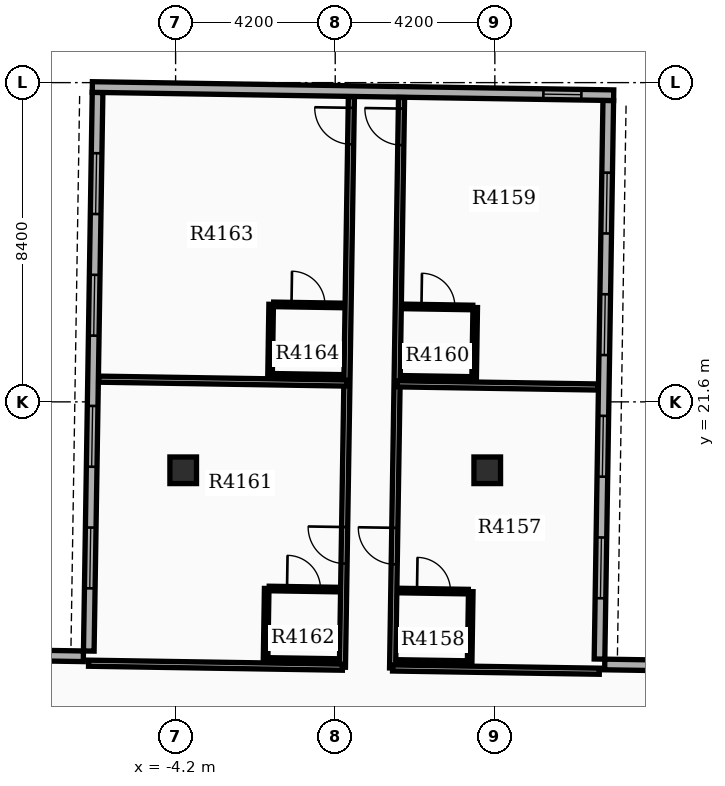
"""IFC4 building model, lengths in metres.
Left out: names, types, materials, properties, quantities, classifications, styles, units other than length and angle.
Written with IfcOpenShell. Run it as: python <this file> out.ifc"""

import sys

from ifc_helpers import new_model, si_unit, direction, frame, frame_2d, origin, origin_2d, place, context, subcontext, project, spatial, rectangle, extrude, element, fill, save


model = new_model("IFC4")
c1 = context("Model", 3, precision=1e-05, world=origin(), true_north=direction((0.0, 1.0)))
c2 = subcontext(c1, "Body", "Model", "MODEL_VIEW")
j1 = project(units=[si_unit("LENGTHUNIT", "METRE"), si_unit("PLANEANGLEUNIT", "RADIAN")], contexts=[c1])
p1 = place(None, origin())
s1 = spatial("IfcSite", under=j1, at=p1, CompositionType="ELEMENT")
p2 = place(p1, origin())
s2 = spatial("IfcBuilding", under=s1, at=p2, CompositionType="ELEMENT")
p3 = place(p2, frame((0.0, 0.0, 261.6)))
s3 = spatial("IfcBuildingStorey", under=s2, at=p3, CompositionType="ELEMENT", Elevation=261.6)
for number, where, z_axis, x_axis in (
    (1, (-4.0, 19.8, 0.0), (0.0, 0.0, 1.0), (1.0, 0.0, 0.0)),
    (2, (4.0, 19.8, 0.0), (0.0, 0.0, 1.0), (1.0, 0.0, 0.0)),
):
    element("IfcColumn", number, at=place(p3, frame(where, z_axis=z_axis, x_axis=x_axis)), inside=s3, PredefinedType="COLUMN", context=c2, shape_type="SweptSolid", body=[
        extrude(rectangle(XDim=0.7, YDim=0.7, at=origin_2d()), origin(), (0.0, 0.0, 1.0), 3.9),
    ])
p4 = place(p3, frame((6.954, 14.833, 0.0), z_axis=(0.0, 0.0, 1.0), x_axis=(0.015711302158, 0.999876569875, 0.0)))
e3 = element("IfcWall", 3, at=p4, inside=s3, PredefinedType="STANDARD", context=c2, shape_type="SweptSolid", body=[
    extrude(rectangle(XDim=14.7, YDim=0.28, at=frame_2d((7.35, 0.0))), origin(), (0.0, 0.0, 1.0), 3.18),
])
p5 = place(p4, frame((1.6, 0.0, 0.8)))
e4 = element("IfcOpeningElement", 4, at=p5, cuts=e3, PredefinedType="OPENING", context=c2, shape_type="SweptSolid", body=[
    extrude(rectangle(XDim=1.6, YDim=1.7, at=frame_2d((0.8, 0.85))), frame((0.0, 0.15, 0.0), z_axis=(0.0, -1.0, 0.0), x_axis=(1.0, 0.0, 0.0)), (0.0, 0.0, 1.0), 0.3),
])
p6 = place(p4, frame((4.8, 0.0, 0.8)))
e5 = element("IfcOpeningElement", 5, at=p6, cuts=e3, PredefinedType="OPENING", context=c2, shape_type="SweptSolid", body=[
    extrude(rectangle(XDim=1.6, YDim=1.7, at=frame_2d((0.8, 0.85))), frame((0.0, 0.15, 0.0), z_axis=(0.0, -1.0, 0.0), x_axis=(1.0, 0.0, 0.0)), (0.0, 0.0, 1.0), 0.3),
])
p7 = place(p4, frame((8.0, 0.0, 0.8)))
e6 = element("IfcOpeningElement", 6, at=p7, cuts=e3, PredefinedType="OPENING", context=c2, shape_type="SweptSolid", body=[
    extrude(rectangle(XDim=1.6, YDim=1.7, at=frame_2d((0.8, 0.85))), frame((0.0, 0.15, 0.0), z_axis=(0.0, -1.0, 0.0), x_axis=(1.0, 0.0, 0.0)), (0.0, 0.0, 1.0), 0.3),
])
p8 = place(p4, frame((11.2, 0.0, 0.8)))
e7 = element("IfcOpeningElement", 7, at=p8, cuts=e3, PredefinedType="OPENING", context=c2, shape_type="SweptSolid", body=[
    extrude(rectangle(XDim=1.6, YDim=1.7, at=frame_2d((0.8, 0.85))), frame((0.0, 0.15, 0.0), z_axis=(0.0, -1.0, 0.0), x_axis=(1.0, 0.0, 0.0)), (0.0, 0.0, 1.0), 0.3),
])
p9 = place(p3, frame((-6.254, 29.742, 0.0), z_axis=(0.0, 0.0, 1.0), x_axis=(-0.015711302158, -0.999876569875, 0.0)))
e8 = element("IfcWall", 8, at=p9, inside=s3, PredefinedType="STANDARD", context=c2, shape_type="SweptSolid", body=[
    extrude(rectangle(XDim=14.7, YDim=0.28, at=frame_2d((7.35, 0.0))), origin(), (0.0, 0.0, 1.0), 3.18),
])
p10 = place(p9, frame((1.6, 0.0, 0.8)))
e9 = element("IfcOpeningElement", 9, at=p10, cuts=e8, PredefinedType="OPENING", context=c2, shape_type="SweptSolid", body=[
    extrude(rectangle(XDim=1.6, YDim=1.7, at=frame_2d((0.8, 0.85))), frame((0.0, 0.15, 0.0), z_axis=(0.0, -1.0, 0.0), x_axis=(1.0, 0.0, 0.0)), (0.0, 0.0, 1.0), 0.3),
])
p11 = place(p9, frame((4.8, 0.0, 0.8)))
e10 = element("IfcOpeningElement", 10, at=p11, cuts=e8, PredefinedType="OPENING", context=c2, shape_type="SweptSolid", body=[
    extrude(rectangle(XDim=1.6, YDim=1.7, at=frame_2d((0.8, 0.85))), frame((0.0, 0.15, 0.0), z_axis=(0.0, -1.0, 0.0), x_axis=(1.0, 0.0, 0.0)), (0.0, 0.0, 1.0), 0.3),
])
p12 = place(p9, frame((8.25, 0.0, 0.8)))
e11 = element("IfcOpeningElement", 11, at=p12, cuts=e8, PredefinedType="OPENING", context=c2, shape_type="SweptSolid", body=[
    extrude(rectangle(XDim=1.6, YDim=1.7, at=frame_2d((0.8, 0.85))), frame((0.0, 0.15, 0.0), z_axis=(0.0, -1.0, 0.0), x_axis=(1.0, 0.0, 0.0)), (0.0, 0.0, 1.0), 0.3),
])
p13 = place(p9, frame((11.45, 0.0, 0.8)))
e12 = element("IfcOpeningElement", 12, at=p13, cuts=e8, PredefinedType="OPENING", context=c2, shape_type="SweptSolid", body=[
    extrude(rectangle(XDim=1.6, YDim=1.7, at=frame_2d((0.8, 0.85))), frame((0.0, 0.15, 0.0), z_axis=(0.0, -1.0, 0.0), x_axis=(1.0, 0.0, 0.0)), (0.0, 0.0, 1.0), 0.3),
])
p14 = place(p3, frame((7.327, 29.669, 0.0), z_axis=(0.0, 0.0, 1.0), x_axis=(-0.999876828887, 0.015694809807, 0.0)))
e13 = element("IfcWall", 13, at=p14, inside=s3, PredefinedType="STANDARD", context=c2, shape_type="SweptSolid", body=[
    extrude(rectangle(XDim=13.72, YDim=0.28, at=frame_2d((6.86, 0.0))), origin(), (0.0, 0.0, 1.0), 3.18),
])
p15 = place(p14, frame((0.85, 0.0, 0.85)))
e14 = element("IfcOpeningElement", 14, at=p15, cuts=e13, PredefinedType="OPENING", context=c2, shape_type="SweptSolid", body=[
    extrude(rectangle(XDim=1.0, YDim=1.5, at=frame_2d((0.5, 0.75))), frame((0.0, 0.15, 0.0), z_axis=(0.0, -1.0, 0.0), x_axis=(1.0, 0.0, 0.0)), (0.0, 0.0, 1.0), 0.3),
])
p16 = place(p3, frame((13.391, 14.592, 0.0), z_axis=(0.0, 0.0, 1.0), x_axis=(-0.999876833368, 0.015694524359, 0.0)))
e15 = element("IfcWall", 15, at=p16, inside=s3, PredefinedType="STANDARD", context=c2, shape_type="SweptSolid", body=[
    extrude(rectangle(XDim=6.3, YDim=0.28, at=frame_2d((3.15, 0.0))), origin(), (0.0, 0.0, 1.0), 3.18),
])
p17 = place(p3, frame((-12.926, 15.005, 0.0), z_axis=(0.0, 0.0, 1.0), x_axis=(0.999876823822, -0.015695132501, 0.0)))
e16 = element("IfcWall", 16, at=p17, inside=s3, PredefinedType="STANDARD", context=c2, shape_type="SweptSolid", body=[
    extrude(rectangle(XDim=6.3, YDim=0.28, at=frame_2d((3.15, 0.0))), origin(), (0.0, 0.0, 1.0), 3.18),
])
p18 = place(p3, frame((1.51, 14.598, 0.0), z_axis=(0.0, 0.0, 1.0), x_axis=(0.015709976686, 0.999876590701, 0.0)))
e17 = element("IfcWall", 17, at=p18, inside=s3, PredefinedType="PARTITIONING", context=c2, shape_type="SweptSolid", body=[
    extrude(rectangle(XDim=15.012, YDim=0.16, at=frame_2d((7.506, 0.0))), origin(), (0.0, 0.0, 1.0), 3.17),
])
p19 = place(p18, frame((2.728, 0.0, 0.0)))
e18 = element("IfcOpeningElement", 18, at=p19, cuts=e17, PredefinedType="OPENING", context=c2, shape_type="SweptSolid", body=[
    extrude(rectangle(XDim=0.96, YDim=2.15, at=frame_2d((0.48, 1.075))), frame((0.0, 0.09, 0.0), z_axis=(0.0, -1.0, 0.0), x_axis=(1.0, 0.0, 0.0)), (0.0, 0.0, 1.0), 0.18),
])
p20 = place(p18, frame((13.76, 0.0, 0.0)))
e19 = element("IfcOpeningElement", 19, at=p20, cuts=e17, PredefinedType="OPENING", context=c2, shape_type="SweptSolid", body=[
    extrude(rectangle(XDim=0.96, YDim=2.15, at=frame_2d((0.48, 1.075))), frame((0.0, 0.09, 0.0), z_axis=(0.0, -1.0, 0.0), x_axis=(1.0, 0.0, 0.0)), (0.0, 0.0, 1.0), 0.18),
])
p21 = place(p3, frame((1.51, 14.598, 0.0), z_axis=(0.0, 0.0, 1.0), x_axis=(0.999876622965, -0.015707923068, 0.0)))
e20 = element("IfcWall", 20, at=p21, inside=s3, PredefinedType="PARTITIONING", context=c2, shape_type="SweptSolid", body=[
    extrude(rectangle(XDim=5.44, YDim=0.16, at=frame_2d((2.72, 0.0))), origin(), (0.0, 0.0, 1.0), 3.17),
])
p22 = place(p3, frame((1.627, 22.074, 0.0), z_axis=(0.0, 0.0, 1.0), x_axis=(0.999876245763, -0.015731915277, 0.0)))
e21 = element("IfcWall", 21, at=p22, inside=s3, PredefinedType="PARTITIONING", context=c2, shape_type="SweptSolid", body=[
    extrude(rectangle(XDim=5.292, YDim=0.16, at=frame_2d((2.646, 0.0))), origin(), (0.0, 0.0, 1.0), 3.17),
])
p23 = place(p3, frame((1.681, 16.635, 0.0), z_axis=(0.0, 0.0, 1.0), x_axis=(0.999878932289, -0.015560230231, 0.0)))
e22 = element("IfcWall", 22, at=p23, inside=s3, PredefinedType="PARTITIONING", context=c2, shape_type="SweptSolid", body=[
    extrude(rectangle(XDim=1.82, YDim=0.12, at=frame_2d((0.91, 0.0))), origin(), (0.0, 0.0, 1.0), 3.17),
])
p24 = place(p23, frame((0.47, 0.0, 0.0)))
e23 = element("IfcOpeningElement", 23, at=p24, cuts=e22, PredefinedType="OPENING", context=c2, shape_type="SweptSolid", body=[
    extrude(rectangle(XDim=0.88, YDim=2.1, at=frame_2d((0.44, 1.05))), frame((0.0, 0.07, 0.0), z_axis=(0.0, -1.0, 0.0), x_axis=(1.0, 0.0, 0.0)), (0.0, 0.0, 1.0), 0.14),
])
p25 = place(p3, frame((1.652, 14.756, 0.0), z_axis=(0.0, 0.0, 1.0), x_axis=(0.999876803258, -0.015696442504, 0.0)))
e24 = element("IfcWall", 24, at=p25, inside=s3, PredefinedType="PARTITIONING", context=c2, shape_type="SweptSolid", body=[
    extrude(rectangle(XDim=1.82, YDim=0.12, at=frame_2d((0.91, 0.0))), origin(), (0.0, 0.0, 1.0), 3.17),
])
p26 = place(p3, frame((3.537, 14.726, 0.0), z_axis=(0.0, 0.0, 1.0), x_axis=(0.015844224657, 0.999874472394, 0.0)))
e25 = element("IfcWall", 25, at=p26, inside=s3, PredefinedType="PARTITIONING", context=c2, shape_type="SweptSolid", body=[
    extrude(rectangle(XDim=1.88, YDim=0.12, at=frame_2d((0.94, 0.0))), origin(), (0.0, 0.0, 1.0), 3.17),
])
p27 = place(p3, frame((1.799, 24.112, 0.0), z_axis=(0.0, 0.0, 1.0), x_axis=(0.999874688728, -0.015830566654, 0.0)))
e26 = element("IfcWall", 26, at=p27, inside=s3, PredefinedType="PARTITIONING", context=c2, shape_type="SweptSolid", body=[
    extrude(rectangle(XDim=1.82, YDim=0.12, at=frame_2d((0.91, 0.0))), origin(), (0.0, 0.0, 1.0), 3.17),
])
p28 = place(p27, frame((0.47, 0.0, 0.0)))
e27 = element("IfcOpeningElement", 27, at=p28, cuts=e26, PredefinedType="OPENING", context=c2, shape_type="SweptSolid", body=[
    extrude(rectangle(XDim=0.88, YDim=2.1, at=frame_2d((0.44, 1.05))), frame((0.0, 0.07, 0.0), z_axis=(0.0, -1.0, 0.0), x_axis=(1.0, 0.0, 0.0)), (0.0, 0.0, 1.0), 0.14),
])
p29 = place(p3, frame((1.769, 22.232, 0.0), z_axis=(0.0, 0.0, 1.0), x_axis=(0.999876836305, -0.015694337248, 0.0)))
e28 = element("IfcWall", 28, at=p29, inside=s3, PredefinedType="PARTITIONING", context=c2, shape_type="SweptSolid", body=[
    extrude(rectangle(XDim=1.82, YDim=0.12, at=frame_2d((0.91, 0.0))), origin(), (0.0, 0.0, 1.0), 3.17),
])
p30 = place(p3, frame((3.654, 22.202, 0.0), z_axis=(0.0, 0.0, 1.0), x_axis=(0.01558454688, 0.999878553575, 0.0)))
e29 = element("IfcWall", 29, at=p30, inside=s3, PredefinedType="PARTITIONING", context=c2, shape_type="SweptSolid", body=[
    extrude(rectangle(XDim=1.88, YDim=0.12, at=frame_2d((0.94, 0.0))), origin(), (0.0, 0.0, 1.0), 3.17),
])
p31 = place(p3, frame((0.19, 14.619, 0.0), z_axis=(0.0, 0.0, 1.0), x_axis=(0.015710232149, 0.999876586687, 0.0)))
e30 = element("IfcWall", 30, at=p31, inside=s3, PredefinedType="PARTITIONING", context=c2, shape_type="SweptSolid", body=[
    extrude(rectangle(XDim=15.012, YDim=0.16, at=frame_2d((7.506, 0.0))), origin(), (0.0, 0.0, 1.0), 3.17),
])
p32 = place(p31, frame((2.728, 0.0, 0.0)))
e31 = element("IfcOpeningElement", 31, at=p32, cuts=e30, PredefinedType="OPENING", context=c2, shape_type="SweptSolid", body=[
    extrude(rectangle(XDim=0.96, YDim=2.15, at=frame_2d((0.48, 1.075))), frame((0.0, 0.09, 0.0), z_axis=(0.0, -1.0, 0.0), x_axis=(1.0, 0.0, 0.0)), (0.0, 0.0, 1.0), 0.18),
])
p33 = place(p31, frame((13.76, 0.0, 0.0)))
e32 = element("IfcOpeningElement", 32, at=p33, cuts=e30, PredefinedType="OPENING", context=c2, shape_type="SweptSolid", body=[
    extrude(rectangle(XDim=0.96, YDim=2.15, at=frame_2d((0.48, 1.075))), frame((0.0, 0.09, 0.0), z_axis=(0.0, -1.0, 0.0), x_axis=(1.0, 0.0, 0.0)), (0.0, 0.0, 1.0), 0.18),
])
p34 = place(p3, frame((0.19, 14.619, 0.0), z_axis=(0.0, 0.0, 1.0), x_axis=(-0.999877076246, 0.015679043267, 0.0)))
e33 = element("IfcWall", 33, at=p34, inside=s3, PredefinedType="PARTITIONING", context=c2, shape_type="SweptSolid", body=[
    extrude(rectangle(XDim=6.68, YDim=0.16, at=frame_2d((3.34, 0.0))), origin(), (0.0, 0.0, 1.0), 3.17),
])
p35 = place(p3, frame((0.307, 22.095, 0.0), z_axis=(0.0, 0.0, 1.0), x_axis=(-0.999876781534, 0.015697826265, 0.0)))
e34 = element("IfcWall", 34, at=p35, inside=s3, PredefinedType="PARTITIONING", context=c2, shape_type="SweptSolid", body=[
    extrude(rectangle(XDim=6.532, YDim=0.16, at=frame_2d((3.266, 0.0))), origin(), (0.0, 0.0, 1.0), 3.17),
])
p36 = place(p3, frame((-1.738, 16.689, 0.0), z_axis=(0.0, 0.0, 1.0), x_axis=(0.999876836305, -0.015694337248, 0.0)))
e35 = element("IfcWall", 35, at=p36, inside=s3, PredefinedType="PARTITIONING", context=c2, shape_type="SweptSolid", body=[
    extrude(rectangle(XDim=1.82, YDim=0.12, at=frame_2d((0.91, 0.0))), origin(), (0.0, 0.0, 1.0), 3.17),
])
p37 = place(p36, frame((0.47, 0.0, 0.0)))
e36 = element("IfcOpeningElement", 36, at=p37, cuts=e35, PredefinedType="OPENING", context=c2, shape_type="SweptSolid", body=[
    extrude(rectangle(XDim=0.88, YDim=2.1, at=frame_2d((0.44, 1.05))), frame((0.0, 0.07, 0.0), z_axis=(0.0, -1.0, 0.0), x_axis=(1.0, 0.0, 0.0)), (0.0, 0.0, 1.0), 0.14),
])
p38 = place(p3, frame((-1.768, 14.81, 0.0), z_axis=(0.0, 0.0, 1.0), x_axis=(0.999876836305, -0.015694337248, 0.0)))
e37 = element("IfcWall", 37, at=p38, inside=s3, PredefinedType="PARTITIONING", context=c2, shape_type="SweptSolid", body=[
    extrude(rectangle(XDim=1.82, YDim=0.12, at=frame_2d((0.91, 0.0))), origin(), (0.0, 0.0, 1.0), 3.17),
])
p39 = place(p3, frame((-1.833, 14.811, 0.0), z_axis=(0.0, 0.0, 1.0), x_axis=(0.01571234584, 0.999876553475, 0.0)))
e38 = element("IfcWall", 38, at=p39, inside=s3, PredefinedType="PARTITIONING", context=c2, shape_type="SweptSolid", body=[
    extrude(rectangle(XDim=1.88, YDim=0.12, at=frame_2d((0.94, 0.0))), origin(), (0.0, 0.0, 1.0), 3.17),
])
p40 = place(p3, frame((-1.621, 24.165, 0.0), z_axis=(0.0, 0.0, 1.0), x_axis=(0.999876836305, -0.015694337248, 0.0)))
e39 = element("IfcWall", 39, at=p40, inside=s3, PredefinedType="PARTITIONING", context=c2, shape_type="SweptSolid", body=[
    extrude(rectangle(XDim=1.82, YDim=0.12, at=frame_2d((0.91, 0.0))), origin(), (0.0, 0.0, 1.0), 3.17),
])
p41 = place(p40, frame((0.47, 0.0, 0.0)))
e40 = element("IfcOpeningElement", 40, at=p41, cuts=e39, PredefinedType="OPENING", context=c2, shape_type="SweptSolid", body=[
    extrude(rectangle(XDim=0.88, YDim=2.1, at=frame_2d((0.44, 1.05))), frame((0.0, 0.07, 0.0), z_axis=(0.0, -1.0, 0.0), x_axis=(1.0, 0.0, 0.0)), (0.0, 0.0, 1.0), 0.14),
])
p42 = place(p3, frame((-1.65, 22.286, 0.0), z_axis=(0.0, 0.0, 1.0), x_axis=(0.999876836305, -0.015694337248, 0.0)))
e41 = element("IfcWall", 41, at=p42, inside=s3, PredefinedType="PARTITIONING", context=c2, shape_type="SweptSolid", body=[
    extrude(rectangle(XDim=1.82, YDim=0.12, at=frame_2d((0.91, 0.0))), origin(), (0.0, 0.0, 1.0), 3.17),
])
p43 = place(p3, frame((-1.715, 22.287, 0.0), z_axis=(0.0, 0.0, 1.0), x_axis=(0.01571234584, 0.999876553475, 0.0)))
e42 = element("IfcWall", 42, at=p43, inside=s3, PredefinedType="PARTITIONING", context=c2, shape_type="SweptSolid", body=[
    extrude(rectangle(XDim=1.88, YDim=0.12, at=frame_2d((0.94, 0.0))), origin(), (0.0, 0.0, 1.0), 3.17),
])
p44 = place(p5, origin())
e43 = element("IfcWindow", 43, at=p44, inside=s3, PartitioningType="SINGLE_PANEL", PredefinedType="WINDOW", context=c2, shape_type="SweptSolid", body=[
    extrude(rectangle(XDim=1.6, YDim=1.7, at=frame_2d((0.8, 0.85))), frame((0.0, 0.03, 0.0), z_axis=(0.0, -1.0, 0.0), x_axis=(1.0, 0.0, 0.0)), (0.0, 0.0, 1.0), 0.06),
])
fill(e4, e43)
p45 = place(p6, origin())
e44 = element("IfcWindow", 44, at=p45, inside=s3, PartitioningType="SINGLE_PANEL", PredefinedType="WINDOW", context=c2, shape_type="SweptSolid", body=[
    extrude(rectangle(XDim=1.6, YDim=1.7, at=frame_2d((0.8, 0.85))), frame((0.0, 0.03, 0.0), z_axis=(0.0, -1.0, 0.0), x_axis=(1.0, 0.0, 0.0)), (0.0, 0.0, 1.0), 0.06),
])
fill(e5, e44)
p46 = place(p7, origin())
e45 = element("IfcWindow", 45, at=p46, inside=s3, PartitioningType="SINGLE_PANEL", PredefinedType="WINDOW", context=c2, shape_type="SweptSolid", body=[
    extrude(rectangle(XDim=1.6, YDim=1.7, at=frame_2d((0.8, 0.85))), frame((0.0, 0.03, 0.0), z_axis=(0.0, -1.0, 0.0), x_axis=(1.0, 0.0, 0.0)), (0.0, 0.0, 1.0), 0.06),
])
fill(e6, e45)
p47 = place(p8, origin())
e46 = element("IfcWindow", 46, at=p47, inside=s3, PartitioningType="SINGLE_PANEL", PredefinedType="WINDOW", context=c2, shape_type="SweptSolid", body=[
    extrude(rectangle(XDim=1.6, YDim=1.7, at=frame_2d((0.8, 0.85))), frame((0.0, 0.03, 0.0), z_axis=(0.0, -1.0, 0.0), x_axis=(1.0, 0.0, 0.0)), (0.0, 0.0, 1.0), 0.06),
])
fill(e7, e46)
p48 = place(p10, origin())
e47 = element("IfcWindow", 47, at=p48, inside=s3, PartitioningType="SINGLE_PANEL", PredefinedType="WINDOW", context=c2, shape_type="SweptSolid", body=[
    extrude(rectangle(XDim=1.6, YDim=1.7, at=frame_2d((0.8, 0.85))), frame((0.0, 0.03, 0.0), z_axis=(0.0, -1.0, 0.0), x_axis=(1.0, 0.0, 0.0)), (0.0, 0.0, 1.0), 0.06),
])
fill(e9, e47)
p49 = place(p11, origin())
e48 = element("IfcWindow", 48, at=p49, inside=s3, PartitioningType="SINGLE_PANEL", PredefinedType="WINDOW", context=c2, shape_type="SweptSolid", body=[
    extrude(rectangle(XDim=1.6, YDim=1.7, at=frame_2d((0.8, 0.85))), frame((0.0, 0.03, 0.0), z_axis=(0.0, -1.0, 0.0), x_axis=(1.0, 0.0, 0.0)), (0.0, 0.0, 1.0), 0.06),
])
fill(e10, e48)
p50 = place(p12, origin())
e49 = element("IfcWindow", 49, at=p50, inside=s3, PartitioningType="SINGLE_PANEL", PredefinedType="WINDOW", context=c2, shape_type="SweptSolid", body=[
    extrude(rectangle(XDim=1.6, YDim=1.7, at=frame_2d((0.8, 0.85))), frame((0.0, 0.03, 0.0), z_axis=(0.0, -1.0, 0.0), x_axis=(1.0, 0.0, 0.0)), (0.0, 0.0, 1.0), 0.06),
])
fill(e11, e49)
p51 = place(p13, origin())
e50 = element("IfcWindow", 50, at=p51, inside=s3, PartitioningType="SINGLE_PANEL", PredefinedType="WINDOW", context=c2, shape_type="SweptSolid", body=[
    extrude(rectangle(XDim=1.6, YDim=1.7, at=frame_2d((0.8, 0.85))), frame((0.0, 0.03, 0.0), z_axis=(0.0, -1.0, 0.0), x_axis=(1.0, 0.0, 0.0)), (0.0, 0.0, 1.0), 0.06),
])
fill(e12, e50)
p52 = place(p15, origin())
e51 = element("IfcWindow", 51, at=p52, inside=s3, PartitioningType="SINGLE_PANEL", PredefinedType="WINDOW", context=c2, shape_type="SweptSolid", body=[
    extrude(rectangle(XDim=1.0, YDim=1.5, at=frame_2d((0.5, 0.75))), frame((0.0, 0.03, 0.0), z_axis=(0.0, -1.0, 0.0), x_axis=(1.0, 0.0, 0.0)), (0.0, 0.0, 1.0), 0.06),
])
fill(e14, e51)
p53 = place(p19, origin())
e52 = element("IfcDoor", 52, at=p53, inside=s3, OperationType="SINGLE_SWING_RIGHT", PredefinedType="DOOR", context=c2, shape_type="SweptSolid", body=[
    extrude(rectangle(XDim=0.96, YDim=2.15, at=frame_2d((0.48, 1.075))), frame((0.0, 0.025, 0.0), z_axis=(0.0, -1.0, 0.0), x_axis=(1.0, 0.0, 0.0)), (0.0, 0.0, 1.0), 0.05),
])
fill(e18, e52)
p54 = place(p24, origin())
e53 = element("IfcDoor", 53, at=p54, inside=s3, OperationType="SINGLE_SWING_LEFT", PredefinedType="DOOR", context=c2, shape_type="SweptSolid", body=[
    extrude(rectangle(XDim=0.88, YDim=2.1, at=frame_2d((0.44, 1.05))), frame((0.0, 0.025, 0.0), z_axis=(0.0, -1.0, 0.0), x_axis=(1.0, 0.0, 0.0)), (0.0, 0.0, 1.0), 0.05),
])
fill(e23, e53)
p55 = place(p20, origin())
e54 = element("IfcDoor", 54, at=p55, inside=s3, OperationType="SINGLE_SWING_RIGHT", PredefinedType="DOOR", context=c2, shape_type="SweptSolid", body=[
    extrude(rectangle(XDim=0.96, YDim=2.15, at=frame_2d((0.48, 1.075))), frame((0.0, 0.025, 0.0), z_axis=(0.0, -1.0, 0.0), x_axis=(1.0, 0.0, 0.0)), (0.0, 0.0, 1.0), 0.05),
])
fill(e19, e54)
p56 = place(p28, origin())
e55 = element("IfcDoor", 55, at=p56, inside=s3, OperationType="SINGLE_SWING_LEFT", PredefinedType="DOOR", context=c2, shape_type="SweptSolid", body=[
    extrude(rectangle(XDim=0.88, YDim=2.1, at=frame_2d((0.44, 1.05))), frame((0.0, 0.025, 0.0), z_axis=(0.0, -1.0, 0.0), x_axis=(1.0, 0.0, 0.0)), (0.0, 0.0, 1.0), 0.05),
])
fill(e27, e55)
p57 = place(p32, origin())
e56 = element("IfcDoor", 56, at=p57, inside=s3, OperationType="SINGLE_SWING_RIGHT", PredefinedType="DOOR", context=c2, shape_type="SweptSolid", body=[
    extrude(rectangle(XDim=0.96, YDim=2.15, at=frame_2d((0.48, 1.075))), frame((0.0, 0.025, 0.0), z_axis=(0.0, -1.0, 0.0), x_axis=(1.0, 0.0, 0.0)), (0.0, 0.0, 1.0), 0.05),
])
fill(e31, e56)
p58 = place(p37, origin())
e57 = element("IfcDoor", 57, at=p58, inside=s3, OperationType="SINGLE_SWING_LEFT", PredefinedType="DOOR", context=c2, shape_type="SweptSolid", body=[
    extrude(rectangle(XDim=0.88, YDim=2.1, at=frame_2d((0.44, 1.05))), frame((0.0, 0.025, 0.0), z_axis=(0.0, -1.0, 0.0), x_axis=(1.0, 0.0, 0.0)), (0.0, 0.0, 1.0), 0.05),
])
fill(e36, e57)
p59 = place(p33, origin())
e58 = element("IfcDoor", 58, at=p59, inside=s3, OperationType="SINGLE_SWING_RIGHT", PredefinedType="DOOR", context=c2, shape_type="SweptSolid", body=[
    extrude(rectangle(XDim=0.96, YDim=2.15, at=frame_2d((0.48, 1.075))), frame((0.0, 0.025, 0.0), z_axis=(0.0, -1.0, 0.0), x_axis=(1.0, 0.0, 0.0)), (0.0, 0.0, 1.0), 0.05),
])
fill(e32, e58)
p60 = place(p41, origin())
e59 = element("IfcDoor", 59, at=p60, inside=s3, OperationType="SINGLE_SWING_LEFT", PredefinedType="DOOR", context=c2, shape_type="SweptSolid", body=[
    extrude(rectangle(XDim=0.88, YDim=2.1, at=frame_2d((0.44, 1.05))), frame((0.0, 0.025, 0.0), z_axis=(0.0, -1.0, 0.0), x_axis=(1.0, 0.0, 0.0)), (0.0, 0.0, 1.0), 0.05),
])
fill(e40, e59)
save(model, sys.argv[1])
